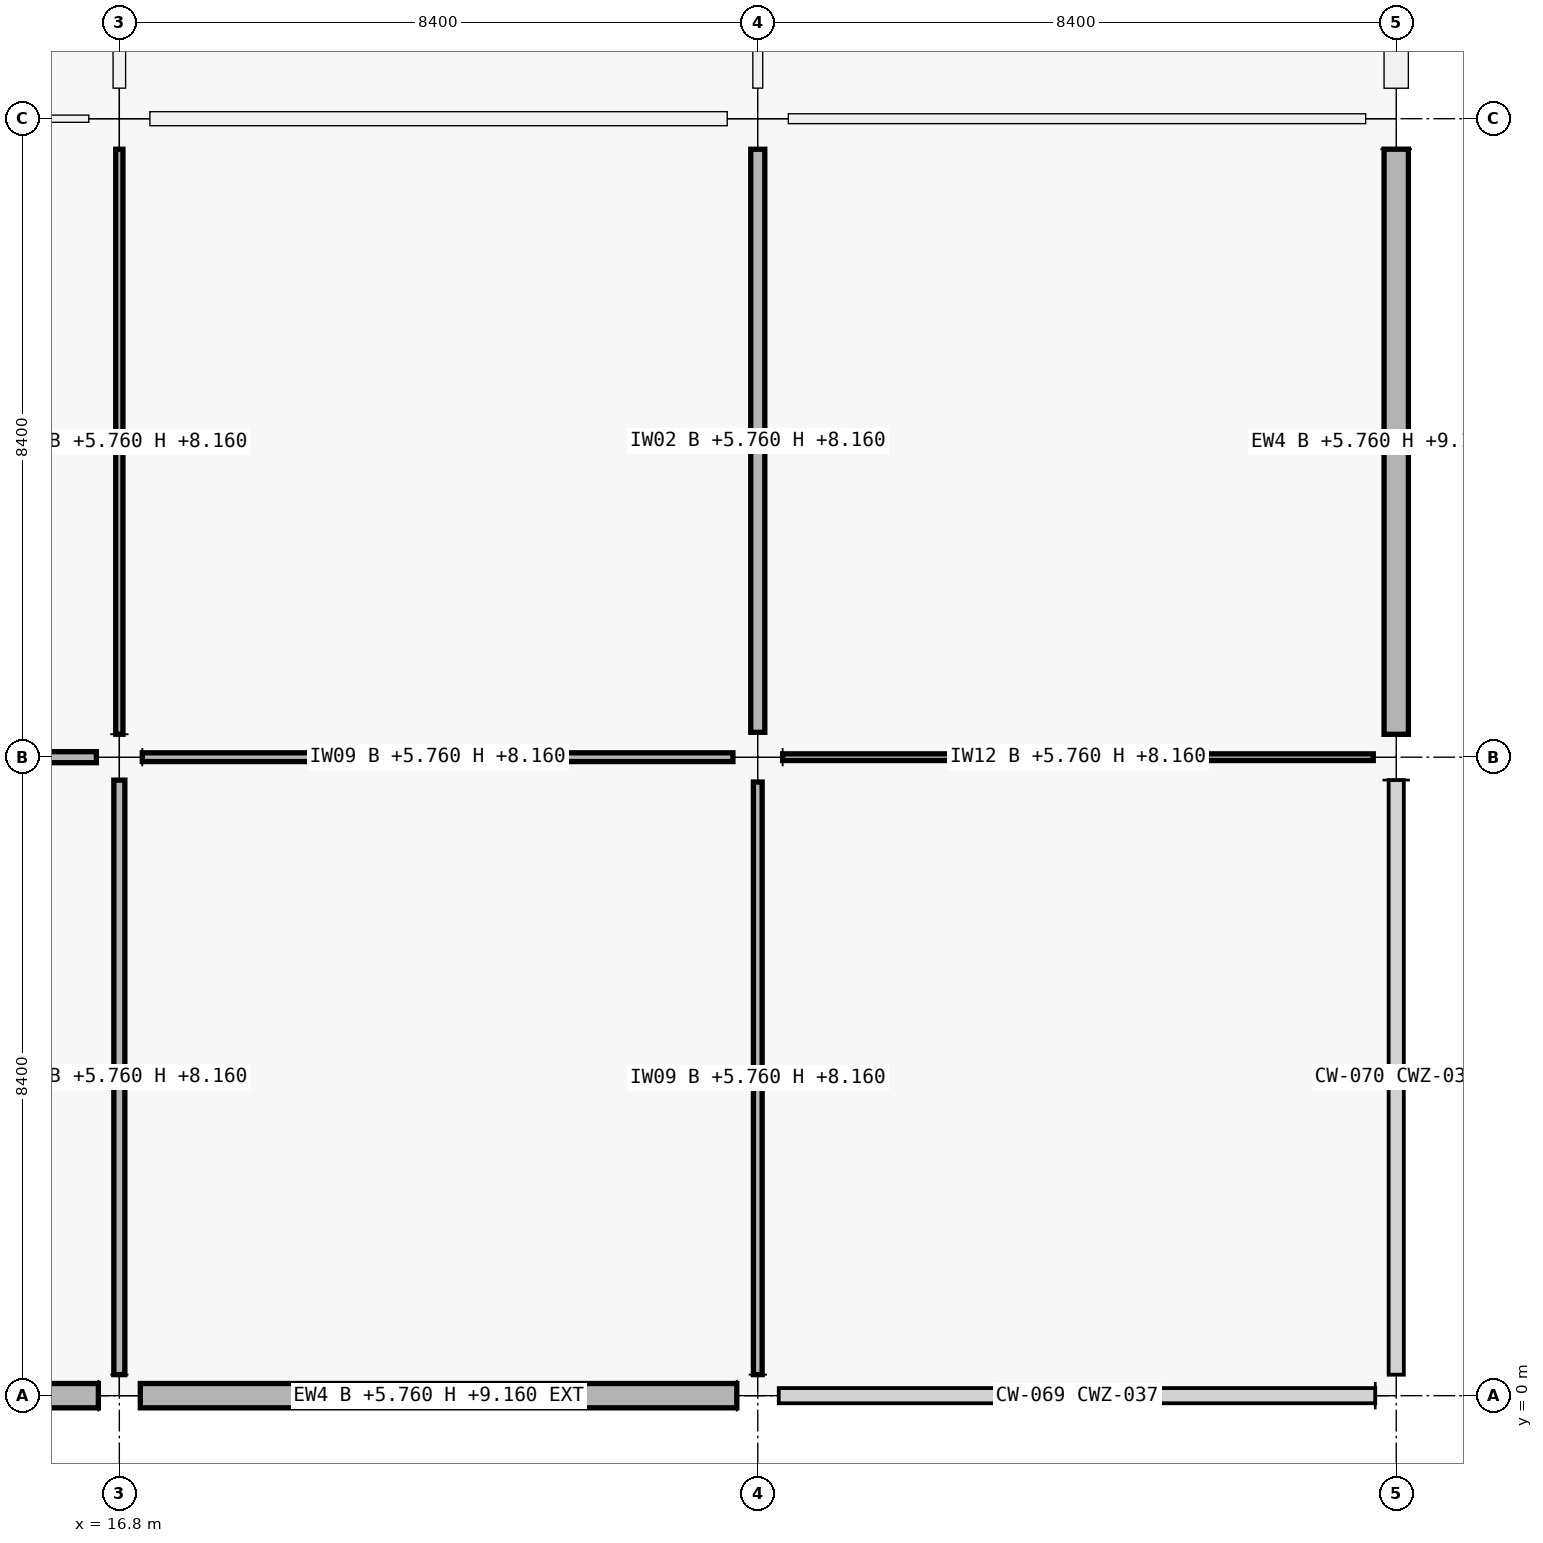
"""IFC4 building model, lengths in metres.
Left out: names, types, materials, properties, quantities, classifications, styles, units other than length and angle.
Written with IfcOpenShell. Run it as: python <this file> out.ifc"""

import sys

from ifc_helpers import new_model, si_unit, direction, frame, frame_2d, origin, origin_2d, place, context, subcontext, project, spatial, rectangle, extrude, element, fill, save


model = new_model("IFC4")
c1 = context("Model", 3, precision=1e-05, world=origin(), true_north=direction((0.0, 1.0)))
c2 = subcontext(c1, "Body", "Model", "MODEL_VIEW")
j1 = project(units=[si_unit("LENGTHUNIT", "METRE"), si_unit("PLANEANGLEUNIT", "RADIAN")], contexts=[c1])
p1 = place(None, origin())
s1 = spatial("IfcSite", under=j1, at=p1, CompositionType="ELEMENT")
p2 = place(p1, origin())
s2 = spatial("IfcBuilding", under=s1, at=p2, CompositionType="ELEMENT")
p3 = place(p2, frame((0.0, 0.0, 5.76)))
s3 = spatial("IfcBuildingStorey", under=s2, at=p3, CompositionType="ELEMENT", Elevation=5.76)
p4 = place(p3, frame((16.8, 0.0, 0.0), z_axis=(0.0, 0.0, 1.0), x_axis=(1.0, 0.0, 0.0)))
e1 = element("IfcColumn", 1, at=p4, inside=s3, PredefinedType="COLUMN", context=c2, shape_type="SweptSolid", body=[
    extrude(rectangle(XDim=0.55, YDim=0.55, at=origin_2d()), origin(), (0.0, 0.0, 1.0), 4.2),
])
p5 = place(p3, frame((16.8, 8.4, 0.0), z_axis=(0.0, 0.0, 1.0), x_axis=(1.0, 0.0, 0.0)))
e2 = element("IfcColumn", 2, at=p5, inside=s3, PredefinedType="COLUMN", context=c2, shape_type="SweptSolid", body=[
    extrude(rectangle(XDim=0.6, YDim=0.6, at=origin_2d()), origin(), (0.0, 0.0, 1.0), 4.5),
])
p6 = place(p3, frame((16.8, 16.8, 0.0), z_axis=(0.0, 0.0, 1.0), x_axis=(1.0, 0.0, 0.0)))
e3 = element("IfcColumn", 3, at=p6, inside=s3, PredefinedType="COLUMN", context=c2, shape_type="SweptSolid", body=[
    extrude(rectangle(XDim=0.8, YDim=0.8, at=origin_2d()), origin(), (0.0, 0.0, 1.0), 4.5),
])
p7 = place(p3, frame((25.2, 0.0, 0.0), z_axis=(0.0, 0.0, 1.0), x_axis=(1.0, 0.0, 0.0)))
e4 = element("IfcColumn", 4, at=p7, inside=s3, PredefinedType="COLUMN", context=c2, shape_type="SweptSolid", body=[
    extrude(rectangle(XDim=0.55, YDim=0.55, at=origin_2d()), origin(), (0.0, 0.0, 1.0), 4.2),
])
p8 = place(p3, frame((25.2, 8.4, 0.0), z_axis=(0.0, 0.0, 1.0), x_axis=(1.0, 0.0, 0.0)))
e5 = element("IfcColumn", 5, at=p8, inside=s3, PredefinedType="COLUMN", context=c2, shape_type="SweptSolid", body=[
    extrude(rectangle(XDim=0.65, YDim=0.65, at=origin_2d()), origin(), (0.0, 0.0, 1.0), 4.5),
])
p9 = place(p3, frame((25.2, 16.8, 0.0), z_axis=(0.0, 0.0, 1.0), x_axis=(1.0, 0.0, 0.0)))
e6 = element("IfcColumn", 6, at=p9, inside=s3, PredefinedType="COLUMN", context=c2, shape_type="SweptSolid", body=[
    extrude(rectangle(XDim=0.8, YDim=0.8, at=origin_2d()), origin(), (0.0, 0.0, 1.0), 4.5),
])
p10 = place(p3, frame((33.6, 0.0, 0.0), z_axis=(0.0, 0.0, 1.0), x_axis=(1.0, 0.0, 0.0)))
e7 = element("IfcColumn", 7, at=p10, inside=s3, PredefinedType="COLUMN", context=c2, shape_type="SweptSolid", body=[
    extrude(rectangle(XDim=0.55, YDim=0.55, at=origin_2d()), origin(), (0.0, 0.0, 1.0), 4.2),
])
p11 = place(p3, frame((33.6, 8.4, 0.0), z_axis=(0.0, 0.0, 1.0), x_axis=(1.0, 0.0, 0.0)))
e8 = element("IfcColumn", 8, at=p11, inside=s3, PredefinedType="COLUMN", context=c2, shape_type="SweptSolid", body=[
    extrude(rectangle(XDim=0.6, YDim=0.6, at=origin_2d()), origin(), (0.0, 0.0, 1.0), 4.5),
])
p12 = place(p3, frame((33.6, 16.8, 0.0), z_axis=(0.0, 0.0, 1.0), x_axis=(1.0, 0.0, 0.0)))
e9 = element("IfcColumn", 9, at=p12, inside=s3, PredefinedType="COLUMN", context=c2, shape_type="SweptSolid", body=[
    extrude(rectangle(XDim=0.8, YDim=0.8, at=origin_2d()), origin(), (0.0, 0.0, 1.0), 4.5),
])
p13 = place(p3, frame((16.524, 0.0, 0.0), z_axis=(0.0, 0.0, 1.0), x_axis=(-1.0, 0.0, 0.0)))
e10 = element("IfcWall", 10, at=p13, inside=s3, PredefinedType="SOLIDWALL", context=c2, shape_type="SweptSolid", body=[
    extrude(rectangle(XDim=7.848, YDim=0.32, at=frame_2d((3.924, 0.0))), origin(), (0.0, 0.0, 1.0), 3.4),
])
p14 = place(p13, frame((3.249, 0.0, 0.9)))
e11 = element("IfcOpeningElement", 11, at=p14, cuts=e10, PredefinedType="OPENING", context=c2, shape_type="SweptSolid", body=[
    extrude(rectangle(XDim=1.35, YDim=1.5, at=frame_2d((0.675, 0.75))), frame((0.0, 0.16, 0.0), z_axis=(0.0, -1.0, 0.0), x_axis=(1.0, 0.0, 0.0)), (0.0, 0.0, 1.0), 0.32),
])
p15 = place(p3, frame((24.924, 0.0, 0.0), z_axis=(0.0, 0.0, 1.0), x_axis=(-1.0, 0.0, 0.0)))
e12 = element("IfcWall", 12, at=p15, inside=s3, PredefinedType="SOLIDWALL", context=c2, shape_type="SweptSolid", body=[
    extrude(rectangle(XDim=7.848, YDim=0.32, at=frame_2d((3.924, 0.0))), origin(), (0.0, 0.0, 1.0), 3.4),
])
p16 = place(p15, frame((3.374, 0.0, 0.9)))
e13 = element("IfcOpeningElement", 13, at=p16, cuts=e12, PredefinedType="OPENING", context=c2, shape_type="SweptSolid", body=[
    extrude(rectangle(XDim=1.1, YDim=1.5, at=frame_2d((0.55, 0.75))), frame((0.0, 0.16, 0.0), z_axis=(0.0, -1.0, 0.0), x_axis=(1.0, 0.0, 0.0)), (0.0, 0.0, 1.0), 0.32),
])
p17 = place(p3, frame((33.6, 16.399, 0.0), z_axis=(0.0, 0.0, 1.0), x_axis=(0.0, -1.0, 0.0)))
e14 = element("IfcWall", 14, at=p17, inside=s3, PredefinedType="SOLIDWALL", context=c2, shape_type="SweptSolid", body=[
    extrude(rectangle(XDim=7.698, YDim=0.32, at=frame_2d((3.849, 0.0))), origin(), (0.0, 0.0, 1.0), 3.4),
])
p18 = place(p17, frame((2.699, 0.0, 0.9)))
e15 = element("IfcOpeningElement", 15, at=p18, cuts=e14, PredefinedType="OPENING", context=c2, shape_type="SweptSolid", body=[
    extrude(rectangle(XDim=2.3, YDim=1.85, at=frame_2d((1.15, 0.925))), frame((0.0, 0.16, 0.0), z_axis=(0.0, -1.0, 0.0), x_axis=(1.0, 0.0, 0.0)), (0.0, 0.0, 1.0), 0.32),
])
p19 = place(p3, frame((33.6, 24.799, 0.0), z_axis=(0.0, 0.0, 1.0), x_axis=(0.0, -1.0, 0.0)))
e16 = element("IfcWall", 16, at=p19, inside=s3, PredefinedType="SOLIDWALL", context=c2, shape_type="SweptSolid", body=[
    extrude(rectangle(XDim=7.598, YDim=0.32, at=frame_2d((3.799, 0.0))), origin(), (0.0, 0.0, 1.0), 3.4),
])
p20 = place(p19, frame((2.349, 0.0, 0.9)))
e17 = element("IfcOpeningElement", 17, at=p20, cuts=e16, PredefinedType="OPENING", context=c2, shape_type="SweptSolid", body=[
    extrude(rectangle(XDim=2.9, YDim=1.85, at=frame_2d((1.45, 0.925))), frame((0.0, 0.16, 0.0), z_axis=(0.0, -1.0, 0.0), x_axis=(1.0, 0.0, 0.0)), (0.0, 0.0, 1.0), 0.32),
])
p21 = place(p3, frame((8.727, 8.4, 0.0), z_axis=(0.0, 0.0, 1.0), x_axis=(1.0, 0.0, 0.0)))
e18 = element("IfcWall", 18, at=p21, inside=s3, PredefinedType="PARTITIONING", context=c2, shape_type="SweptSolid", body=[
    extrude(rectangle(XDim=7.771, YDim=0.145, at=frame_2d((3.885, 0.0))), origin(), (0.0, 0.0, 1.0), 2.4),
])
p22 = place(p21, frame((3.415, 0.0, 0.0)))
e19 = element("IfcOpeningElement", 19, at=p22, cuts=e18, PredefinedType="OPENING", context=c2, shape_type="SweptSolid", body=[
    extrude(rectangle(XDim=0.94, YDim=2.15, at=frame_2d((0.47, 1.075))), frame((0.0, 0.073, 0.0), z_axis=(0.0, -1.0, 0.0), x_axis=(1.0, 0.0, 0.0)), (0.0, 0.0, 1.0), 0.145),
])
p23 = place(p3, frame((8.802, 16.8, 0.0), z_axis=(0.0, 0.0, 1.0), x_axis=(1.0, 0.0, 0.0)))
e20 = element("IfcWall", 20, at=p23, inside=s3, PredefinedType="PARTITIONING", context=c2, shape_type="SweptSolid", body=[
    extrude(rectangle(XDim=7.596, YDim=0.095, at=frame_2d((3.798, 0.0))), origin(), (0.0, 0.0, 1.0), 2.4),
])
p24 = place(p23, frame((3.258, 0.0, 0.0)))
e21 = element("IfcOpeningElement", 21, at=p24, cuts=e20, PredefinedType="OPENING", context=c2, shape_type="SweptSolid", body=[
    extrude(rectangle(XDim=1.08, YDim=2.22, at=frame_2d((0.54, 1.11))), frame((0.0, 0.047, 0.0), z_axis=(0.0, -1.0, 0.0), x_axis=(1.0, 0.0, 0.0)), (0.0, 0.0, 1.0), 0.095),
])
p25 = place(p3, frame((17.102, 8.4, 0.0), z_axis=(0.0, 0.0, 1.0), x_axis=(1.0, 0.0, 0.0)))
e22 = element("IfcWall", 22, at=p25, inside=s3, PredefinedType="PARTITIONING", context=c2, shape_type="SweptSolid", body=[
    extrude(rectangle(XDim=7.771, YDim=0.115, at=frame_2d((3.885, 0.0))), origin(), (0.0, 0.0, 1.0), 2.4),
])
p26 = place(p25, frame((3.361, 0.0, 0.0)))
e23 = element("IfcOpeningElement", 23, at=p26, cuts=e22, PredefinedType="OPENING", context=c2, shape_type="SweptSolid", body=[
    extrude(rectangle(XDim=1.05, YDim=2.12, at=frame_2d((0.525, 1.06))), frame((0.0, 0.058, 0.0), z_axis=(0.0, -1.0, 0.0), x_axis=(1.0, 0.0, 0.0)), (0.0, 0.0, 1.0), 0.115),
])
p27 = place(p3, frame((17.202, 16.8, 0.0), z_axis=(0.0, 0.0, 1.0), x_axis=(1.0, 0.0, 0.0)))
e24 = element("IfcWall", 24, at=p27, inside=s3, PredefinedType="PARTITIONING", context=c2, shape_type="SweptSolid", body=[
    extrude(rectangle(XDim=7.596, YDim=0.185, at=frame_2d((3.798, 0.0))), origin(), (0.0, 0.0, 1.0), 2.4),
])
p28 = place(p27, frame((3.268, 0.0, 0.0)))
e25 = element("IfcOpeningElement", 25, at=p28, cuts=e24, PredefinedType="OPENING", context=c2, shape_type="SweptSolid", body=[
    extrude(rectangle(XDim=1.06, YDim=2.22, at=frame_2d((0.53, 1.11))), frame((0.0, 0.093, 0.0), z_axis=(0.0, -1.0, 0.0), x_axis=(1.0, 0.0, 0.0)), (0.0, 0.0, 1.0), 0.185),
])
p29 = place(p3, frame((25.527, 8.4, 0.0), z_axis=(0.0, 0.0, 1.0), x_axis=(1.0, 0.0, 0.0)))
e26 = element("IfcWall", 26, at=p29, inside=s3, PredefinedType="PARTITIONING", context=c2, shape_type="SweptSolid", body=[
    extrude(rectangle(XDim=7.771, YDim=0.088, at=frame_2d((3.885, 0.0))), origin(), (0.0, 0.0, 1.0), 2.4),
])
p30 = place(p29, frame((3.381, 0.0, 0.0)))
e27 = element("IfcOpeningElement", 27, at=p30, cuts=e26, PredefinedType="OPENING", context=c2, shape_type="SweptSolid", body=[
    extrude(rectangle(XDim=1.01, YDim=2.12, at=frame_2d((0.505, 1.06))), frame((0.0, 0.044, 0.0), z_axis=(0.0, -1.0, 0.0), x_axis=(1.0, 0.0, 0.0)), (0.0, 0.0, 1.0), 0.088),
])
p31 = place(p3, frame((25.602, 16.8, 0.0), z_axis=(0.0, 0.0, 1.0), x_axis=(1.0, 0.0, 0.0)))
e28 = element("IfcWall", 28, at=p31, inside=s3, PredefinedType="MOVABLE", context=c2, shape_type="SweptSolid", body=[
    extrude(rectangle(XDim=7.596, YDim=0.13, at=frame_2d((3.798, 0.0))), origin(), (0.0, 0.0, 1.0), 2.4),
])
p32 = place(p31, frame((3.313, 0.0, 0.0)))
e29 = element("IfcOpeningElement", 29, at=p32, cuts=e28, PredefinedType="OPENING", context=c2, shape_type="SweptSolid", body=[
    extrude(rectangle(XDim=0.97, YDim=2.12, at=frame_2d((0.485, 1.06))), frame((0.0, 0.065, 0.0), z_axis=(0.0, -1.0, 0.0), x_axis=(1.0, 0.0, 0.0)), (0.0, 0.0, 1.0), 0.13),
])
p33 = place(p3, frame((16.8, 0.277, 0.0), z_axis=(0.0, 0.0, 1.0), x_axis=(0.0, 1.0, 0.0)))
e30 = element("IfcWall", 30, at=p33, inside=s3, PredefinedType="PARTITIONING", context=c2, shape_type="SweptSolid", body=[
    extrude(rectangle(XDim=7.821, YDim=0.145, at=frame_2d((3.91, 0.0))), origin(), (0.0, 0.0, 1.0), 2.4),
])
p34 = place(p33, frame((3.45, 0.0, 0.0)))
e31 = element("IfcOpeningElement", 31, at=p34, cuts=e30, PredefinedType="OPENING", context=c2, shape_type="SweptSolid", body=[
    extrude(rectangle(XDim=0.92, YDim=2.15, at=frame_2d((0.46, 1.075))), frame((0.0, 0.073, 0.0), z_axis=(0.0, -1.0, 0.0), x_axis=(1.0, 0.0, 0.0)), (0.0, 0.0, 1.0), 0.145),
])
p35 = place(p3, frame((16.8, 8.702, 0.0), z_axis=(0.0, 0.0, 1.0), x_axis=(0.0, 1.0, 0.0)))
e32 = element("IfcWall", 32, at=p35, inside=s3, PredefinedType="PARTITIONING", context=c2, shape_type="SweptSolid", body=[
    extrude(rectangle(XDim=7.696, YDim=0.095, at=frame_2d((3.848, 0.0))), origin(), (0.0, 0.0, 1.0), 2.4),
])
p36 = place(p35, frame((3.323, 0.0, 0.0)))
e33 = element("IfcOpeningElement", 33, at=p36, cuts=e32, PredefinedType="OPENING", context=c2, shape_type="SweptSolid", body=[
    extrude(rectangle(XDim=1.05, YDim=2.12, at=frame_2d((0.525, 1.06))), frame((0.0, 0.047, 0.0), z_axis=(0.0, -1.0, 0.0), x_axis=(1.0, 0.0, 0.0)), (0.0, 0.0, 1.0), 0.095),
])
p37 = place(p3, frame((16.8, 17.202, 0.0), z_axis=(0.0, 0.0, 1.0), x_axis=(0.0, 1.0, 0.0)))
e34 = element("IfcWall", 34, at=p37, inside=s3, PredefinedType="PARTITIONING", context=c2, shape_type="SweptSolid", body=[
    extrude(rectangle(XDim=7.596, YDim=0.165, at=frame_2d((3.798, 0.0))), origin(), (0.0, 0.0, 1.0), 2.4),
])
p38 = place(p37, frame((3.293, 0.0, 0.0)))
e35 = element("IfcOpeningElement", 35, at=p38, cuts=e34, PredefinedType="OPENING", context=c2, shape_type="SweptSolid", body=[
    extrude(rectangle(XDim=1.01, YDim=2.12, at=frame_2d((0.505, 1.06))), frame((0.0, 0.083, 0.0), z_axis=(0.0, -1.0, 0.0), x_axis=(1.0, 0.0, 0.0)), (0.0, 0.0, 1.0), 0.165),
])
p39 = place(p3, frame((25.2, 0.277, 0.0), z_axis=(0.0, 0.0, 1.0), x_axis=(0.0, 1.0, 0.0)))
e36 = element("IfcWall", 36, at=p39, inside=s3, PredefinedType="PARTITIONING", context=c2, shape_type="SweptSolid", body=[
    extrude(rectangle(XDim=7.796, YDim=0.115, at=frame_2d((3.898, 0.0))), origin(), (0.0, 0.0, 1.0), 2.4),
])
p40 = place(p39, frame((3.358, 0.0, 0.0)))
e37 = element("IfcOpeningElement", 37, at=p40, cuts=e36, PredefinedType="OPENING", context=c2, shape_type="SweptSolid", body=[
    extrude(rectangle(XDim=1.08, YDim=2.22, at=frame_2d((0.54, 1.11))), frame((0.0, 0.058, 0.0), z_axis=(0.0, -1.0, 0.0), x_axis=(1.0, 0.0, 0.0)), (0.0, 0.0, 1.0), 0.115),
])
p41 = place(p3, frame((25.2, 8.727, 0.0), z_axis=(0.0, 0.0, 1.0), x_axis=(0.0, 1.0, 0.0)))
e38 = element("IfcWall", 38, at=p41, inside=s3, PredefinedType="PARTITIONING", context=c2, shape_type="SweptSolid", body=[
    extrude(rectangle(XDim=7.671, YDim=0.185, at=frame_2d((3.835, 0.0))), origin(), (0.0, 0.0, 1.0), 2.4),
])
p42 = place(p41, frame((3.306, 0.0, 0.0)))
e39 = element("IfcOpeningElement", 39, at=p42, cuts=e38, PredefinedType="OPENING", context=c2, shape_type="SweptSolid", body=[
    extrude(rectangle(XDim=1.06, YDim=2.22, at=frame_2d((0.53, 1.11))), frame((0.0, 0.093, 0.0), z_axis=(0.0, -1.0, 0.0), x_axis=(1.0, 0.0, 0.0)), (0.0, 0.0, 1.0), 0.185),
])
p43 = place(p3, frame((25.2, 17.202, 0.0), z_axis=(0.0, 0.0, 1.0), x_axis=(0.0, 1.0, 0.0)))
e40 = element("IfcWall", 40, at=p43, inside=s3, PredefinedType="MOVABLE", context=c2, shape_type="SweptSolid", body=[
    extrude(rectangle(XDim=7.596, YDim=0.13, at=frame_2d((3.798, 0.0))), origin(), (0.0, 0.0, 1.0), 2.4),
])
p44 = place(p43, frame((3.278, 0.0, 0.0)))
e41 = element("IfcOpeningElement", 41, at=p44, cuts=e40, PredefinedType="OPENING", context=c2, shape_type="SweptSolid", body=[
    extrude(rectangle(XDim=1.04, YDim=2.2, at=frame_2d((0.52, 1.1))), frame((0.0, 0.065, 0.0), z_axis=(0.0, -1.0, 0.0), x_axis=(1.0, 0.0, 0.0)), (0.0, 0.0, 1.0), 0.13),
])
p45 = place(p16, origin())
e42 = element("IfcWindow", 42, at=p45, inside=s3, PartitioningType="SINGLE_PANEL", PredefinedType="WINDOW", context=c2, shape_type="SweptSolid", body=[
    extrude(rectangle(XDim=1.1, YDim=1.5, at=frame_2d((0.55, 0.75))), frame((0.0, 0.03, 0.0), z_axis=(0.0, -1.0, 0.0), x_axis=(1.0, 0.0, 0.0)), (0.0, 0.0, 1.0), 0.06),
])
fill(e13, e42)
p46 = place(p18, origin())
e43 = element("IfcWindow", 43, at=p46, inside=s3, PartitioningType="SINGLE_PANEL", PredefinedType="WINDOW", context=c2, shape_type="SweptSolid", body=[
    extrude(rectangle(XDim=2.3, YDim=1.85, at=frame_2d((1.15, 0.925))), frame((0.0, 0.03, 0.0), z_axis=(0.0, -1.0, 0.0), x_axis=(1.0, 0.0, 0.0)), (0.0, 0.0, 1.0), 0.06),
])
fill(e15, e43)
p47 = place(p26, origin())
e44 = element("IfcDoor", 44, at=p47, inside=s3, OperationType="SINGLE_SWING_RIGHT", PredefinedType="DOOR", context=c2, shape_type="SweptSolid", body=[
    extrude(rectangle(XDim=1.05, YDim=2.12, at=frame_2d((0.525, 1.06))), frame((0.0, 0.025, 0.0), z_axis=(0.0, -1.0, 0.0), x_axis=(1.0, 0.0, 0.0)), (0.0, 0.0, 1.0), 0.05),
])
fill(e23, e44)
p48 = place(p30, origin())
e45 = element("IfcDoor", 45, at=p48, inside=s3, OperationType="SINGLE_SWING_LEFT", PredefinedType="DOOR", context=c2, shape_type="SweptSolid", body=[
    extrude(rectangle(XDim=1.01, YDim=2.12, at=frame_2d((0.505, 1.06))), frame((0.0, 0.025, 0.0), z_axis=(0.0, -1.0, 0.0), x_axis=(1.0, 0.0, 0.0)), (0.0, 0.0, 1.0), 0.05),
])
fill(e27, e45)
p49 = place(p32, origin())
e46 = element("IfcDoor", 46, at=p49, inside=s3, OperationType="SINGLE_SWING_RIGHT", PredefinedType="DOOR", context=c2, shape_type="SweptSolid", body=[
    extrude(rectangle(XDim=0.97, YDim=2.12, at=frame_2d((0.485, 1.06))), frame((0.0, 0.025, 0.0), z_axis=(0.0, -1.0, 0.0), x_axis=(1.0, 0.0, 0.0)), (0.0, 0.0, 1.0), 0.05),
])
fill(e29, e46)
p50 = place(p28, origin())
e47 = element("IfcDoor", 47, at=p50, inside=s3, OperationType="SINGLE_SWING_LEFT", PredefinedType="DOOR", context=c2, shape_type="SweptSolid", body=[
    extrude(rectangle(XDim=1.06, YDim=2.22, at=frame_2d((0.53, 1.11))), frame((0.0, 0.025, 0.0), z_axis=(0.0, -1.0, 0.0), x_axis=(1.0, 0.0, 0.0)), (0.0, 0.0, 1.0), 0.05),
])
fill(e25, e47)
p51 = place(p34, origin())
e48 = element("IfcDoor", 48, at=p51, inside=s3, OperationType="SINGLE_SWING_LEFT", PredefinedType="DOOR", context=c2, shape_type="SweptSolid", body=[
    extrude(rectangle(XDim=0.92, YDim=2.15, at=frame_2d((0.46, 1.075))), frame((0.0, 0.025, 0.0), z_axis=(0.0, -1.0, 0.0), x_axis=(1.0, 0.0, 0.0)), (0.0, 0.0, 1.0), 0.05),
])
fill(e31, e48)
p52 = place(p36, origin())
e49 = element("IfcDoor", 49, at=p52, inside=s3, OperationType="SINGLE_SWING_RIGHT", PredefinedType="DOOR", context=c2, shape_type="SweptSolid", body=[
    extrude(rectangle(XDim=1.05, YDim=2.12, at=frame_2d((0.525, 1.06))), frame((0.0, 0.025, 0.0), z_axis=(0.0, -1.0, 0.0), x_axis=(1.0, 0.0, 0.0)), (0.0, 0.0, 1.0), 0.05),
])
fill(e33, e49)
p53 = place(p40, origin())
e50 = element("IfcDoor", 50, at=p53, inside=s3, OperationType="SINGLE_SWING_RIGHT", PredefinedType="DOOR", context=c2, shape_type="SweptSolid", body=[
    extrude(rectangle(XDim=1.08, YDim=2.22, at=frame_2d((0.54, 1.11))), frame((0.0, 0.025, 0.0), z_axis=(0.0, -1.0, 0.0), x_axis=(1.0, 0.0, 0.0)), (0.0, 0.0, 1.0), 0.05),
])
fill(e37, e50)
p54 = place(p42, origin())
e51 = element("IfcDoor", 51, at=p54, inside=s3, OperationType="SINGLE_SWING_LEFT", PredefinedType="DOOR", context=c2, shape_type="SweptSolid", body=[
    extrude(rectangle(XDim=1.06, YDim=2.22, at=frame_2d((0.53, 1.11))), frame((0.0, 0.025, 0.0), z_axis=(0.0, -1.0, 0.0), x_axis=(1.0, 0.0, 0.0)), (0.0, 0.0, 1.0), 0.05),
])
fill(e39, e51)
save(model, sys.argv[1])
